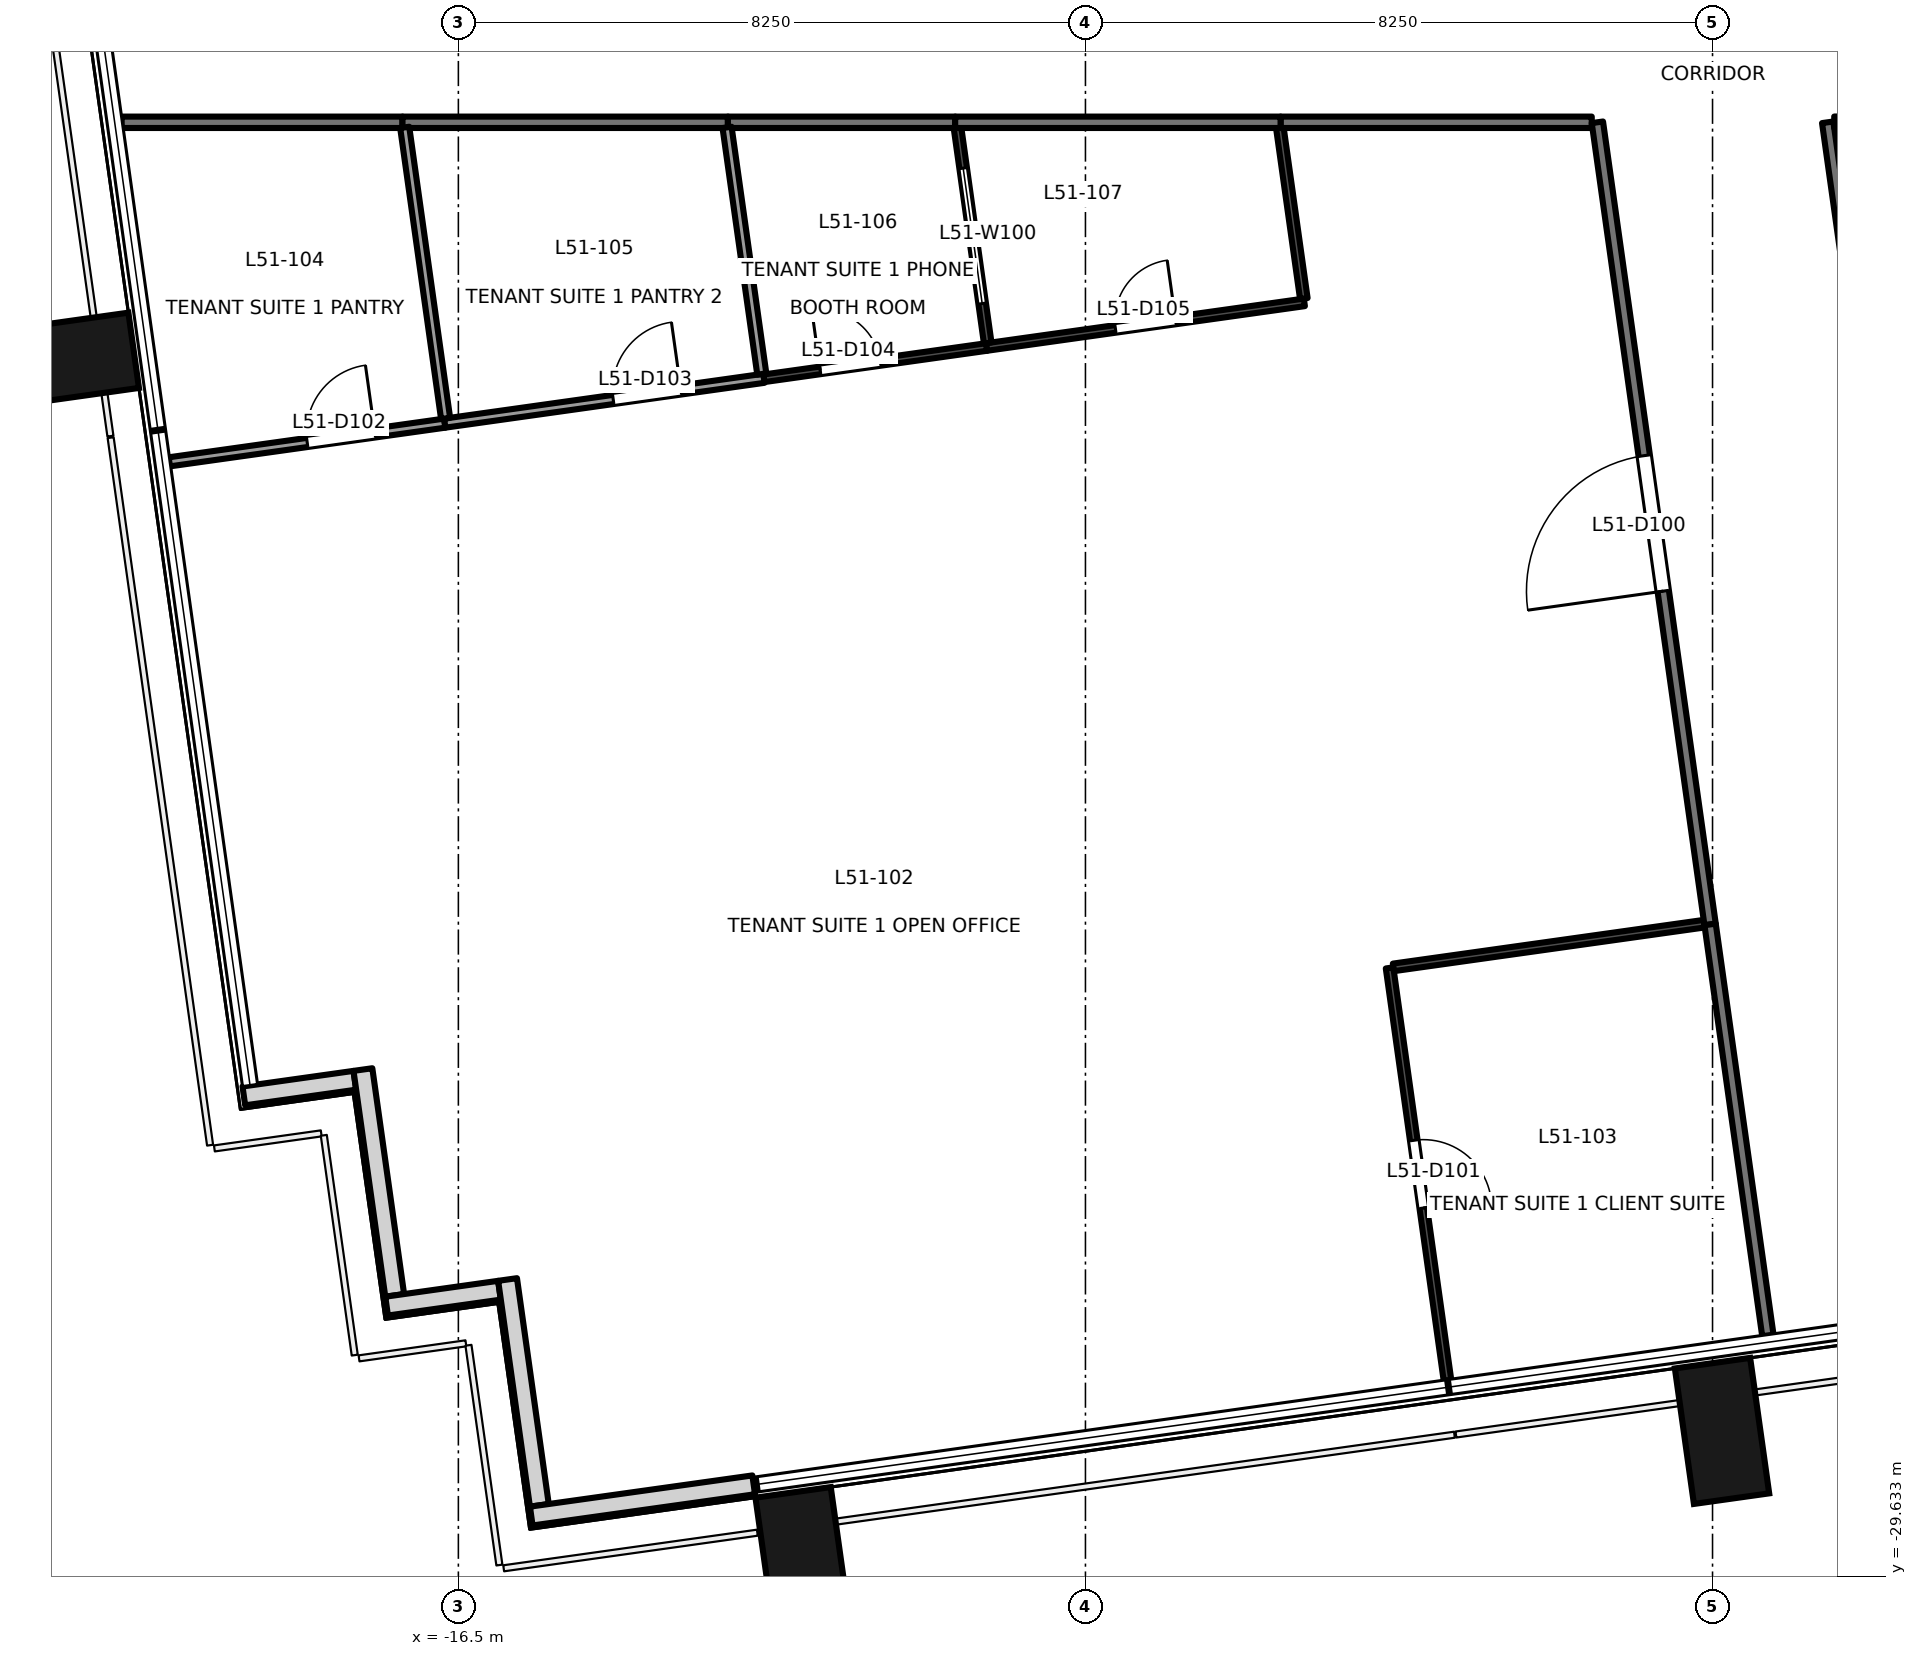
"""IFC4 building model, lengths in metres.
Left out: names, types, materials, properties, quantities, classifications, styles, units other than length and angle.
Written with IfcOpenShell. Run it as: python <this file> out.ifc"""

import sys

from ifc_helpers import new_model, si_unit, direction, frame, frame_2d, origin, origin_2d, place, context, subcontext, project, spatial, rectangle, extrude, element, fill, save


model = new_model("IFC4")
c1 = context("Model", 3, precision=1e-05, world=origin(), true_north=direction((0.0, 1.0)))
c2 = subcontext(c1, "Body", "Model", "MODEL_VIEW")
j1 = project(units=[si_unit("LENGTHUNIT", "METRE"), si_unit("PLANEANGLEUNIT", "RADIAN")], contexts=[c1])
p1 = place(None, origin())
s1 = spatial("IfcSite", under=j1, at=p1, CompositionType="ELEMENT")
p2 = place(p1, origin())
s2 = spatial("IfcBuilding", under=s1, at=p2, CompositionType="ELEMENT")
p3 = place(p2, frame((0.0, 0.0, 225.2)))
s3 = spatial("IfcBuildingStorey", under=s2, at=p3, CompositionType="ELEMENT", Elevation=225.2)
for number, where, z_axis, x_axis in (
    (1, (-11.971, -29.416, -0.2), (0.0, 0.0, 1.0), (0.99, 0.139, 0.0)),
    (2, (0.125, -27.716, -0.2), (0.0, 0.0, 1.0), (0.99, 0.139, 0.0)),
    (3, (-21.663, -13.625, -0.2), (0.0, 0.0, 1.0), (-0.139, 0.99, 0.0)),
):
    element("IfcColumn", number, at=place(p3, frame(where, z_axis=z_axis, x_axis=x_axis)), inside=s3, PredefinedType="COLUMN", context=c2, shape_type="SweptSolid", body=[
        extrude(rectangle(XDim=1.0, YDim=1.8, at=origin_2d()), origin(), (0.0, 0.0, 1.0), 3.9),
    ])
p4 = place(p3, frame((-19.322, -23.309, 0.0), z_axis=(0.0, 0.0, 1.0), x_axis=(0.990235520307, 0.13940449893, 0.0)))
e4 = element("IfcWall", 4, at=p4, inside=s3, PredefinedType="SOLIDWALL", context=c2, shape_type="SweptSolid", body=[
    extrude(rectangle(XDim=1.475, YDim=0.25, at=frame_2d((0.737, 0.0))), origin(), (0.0, 0.0, 1.0), 3.7),
])
p5 = place(p3, frame((-17.756, -22.962, 0.0), z_axis=(0.0, 0.0, 1.0), x_axis=(0.139393225799, -0.990237107263, 0.0)))
e5 = element("IfcWall", 5, at=p5, inside=s3, PredefinedType="SOLIDWALL", context=c2, shape_type="SweptSolid", body=[
    extrude(rectangle(XDim=3.0, YDim=0.25, at=frame_2d((1.5, 0.0))), origin(), (0.0, 0.0, 1.0), 3.7),
])
p6 = place(p3, frame((-17.444, -26.074, 0.0), z_axis=(0.0, 0.0, 1.0), x_axis=(0.990240434918, 0.139369584395, 0.0)))
e6 = element("IfcWall", 6, at=p6, inside=s3, PredefinedType="SOLIDWALL", context=c2, shape_type="SweptSolid", body=[
    extrude(rectangle(XDim=1.5, YDim=0.25, at=frame_2d((0.75, 0.0))), origin(), (0.0, 0.0, 1.0), 3.7),
])
p7 = place(p3, frame((-15.853, -25.724, 0.0), z_axis=(0.0, 0.0, 1.0), x_axis=(0.139302206688, -0.990249915532, 0.0)))
e7 = element("IfcWall", 7, at=p7, inside=s3, PredefinedType="SOLIDWALL", context=c2, shape_type="SweptSolid", body=[
    extrude(rectangle(XDim=3.0, YDim=0.25, at=frame_2d((1.5, 0.0))), origin(), (0.0, 0.0, 1.0), 3.7),
])
p8 = place(p3, frame((-15.541, -28.836, 0.0), z_axis=(0.0, 0.0, 1.0), x_axis=(0.990285396533, 0.139049751574, 0.0)))
e8 = element("IfcWall", 8, at=p8, inside=s3, PredefinedType="SOLIDWALL", context=c2, shape_type="SweptSolid", body=[
    extrude(rectangle(XDim=2.955, YDim=0.25, at=frame_2d((1.478, 0.0))), origin(), (0.0, 0.0, 1.0), 3.7),
])
p9 = place(p3, frame((-1.589, -10.5, 0.0), z_axis=(0.0, 0.0, 1.0), x_axis=(-1.0, 0.0, 0.0)))
e9 = element("IfcWall", 9, at=p9, inside=s3, PredefinedType="PARTITIONING", context=c2, shape_type="SweptSolid", body=[
    extrude(rectangle(XDim=4.094, YDim=0.15, at=frame_2d((2.047, 0.0))), origin(), (0.0, 0.0, 1.0), 2.8),
])
p10 = place(p3, frame((-0.032, -21.053, 0.0), z_axis=(0.0, 0.0, 1.0), x_axis=(-0.139153385275, 0.9902708394, 0.0)))
e10 = element("IfcWall", 10, at=p10, inside=s3, PredefinedType="PARTITIONING", context=c2, shape_type="SweptSolid", body=[
    extrude(rectangle(XDim=10.657, YDim=0.15, at=frame_2d((5.328, 0.0))), origin(), (0.0, 0.0, 1.0), 2.8),
])
p11 = place(p10, frame((4.428, 0.0, 0.0)))
e11 = element("IfcOpeningElement", 11, at=p11, cuts=e10, PredefinedType="OPENING", context=c2, shape_type="SweptSolid", body=[
    extrude(rectangle(XDim=1.8, YDim=2.1, at=frame_2d((0.9, 1.05))), frame((0.0, 0.085, 0.0), z_axis=(0.0, -1.0, 0.0), x_axis=(1.0, 0.0, 0.0)), (0.0, 0.0, 1.0), 0.171),
])
p12 = place(p3, frame((0.728, -26.46, 0.0), z_axis=(0.0, 0.0, 1.0), x_axis=(-0.139192487281, 0.990265343978, 0.0)))
e12 = element("IfcWall", 12, at=p12, inside=s3, PredefinedType="PARTITIONING", context=c2, shape_type="SweptSolid", body=[
    extrude(rectangle(XDim=5.46, YDim=0.15, at=frame_2d((2.73, 0.0))), origin(), (0.0, 0.0, 1.0), 2.8),
])
p13 = place(p3, frame((-17.235, -10.5, 0.0), z_axis=(0.0, 0.0, 1.0), x_axis=(-1.0, 0.0, 0.0)))
e13 = element("IfcWall", 13, at=p13, inside=s3, PredefinedType="PARTITIONING", context=c2, shape_type="SweptSolid", body=[
    extrude(rectangle(XDim=3.695, YDim=0.15, at=frame_2d((1.847, 0.0))), origin(), (0.0, 0.0, 1.0), 3.7),
])
p14 = place(p3, frame((-12.954, -10.5, 0.0), z_axis=(0.0, 0.0, 1.0), x_axis=(-1.0, 0.0, 0.0)))
e14 = element("IfcWall", 14, at=p14, inside=s3, PredefinedType="PARTITIONING", context=c2, shape_type="SweptSolid", body=[
    extrude(rectangle(XDim=4.281, YDim=0.15, at=frame_2d((2.141, 0.0))), origin(), (0.0, 0.0, 1.0), 3.7),
])
p15 = place(p3, frame((-9.964, -10.5, 0.0), z_axis=(0.0, 0.0, 1.0), x_axis=(-1.0, 0.0, 0.0)))
e15 = element("IfcWall", 15, at=p15, inside=s3, PredefinedType="PARTITIONING", context=c2, shape_type="SweptSolid", body=[
    extrude(rectangle(XDim=2.99, YDim=0.15, at=frame_2d((1.495, 0.0))), origin(), (0.0, 0.0, 1.0), 3.7),
])
p16 = place(p3, frame((-5.683, -10.5, 0.0), z_axis=(0.0, 0.0, 1.0), x_axis=(-1.0, 0.0, 0.0)))
e16 = element("IfcWall", 16, at=p16, inside=s3, PredefinedType="PARTITIONING", context=c2, shape_type="SweptSolid", body=[
    extrude(rectangle(XDim=4.281, YDim=0.15, at=frame_2d((2.141, 0.0))), origin(), (0.0, 0.0, 1.0), 2.8),
])
p17 = place(p3, frame((1.515, -10.5, 0.0), z_axis=(0.0, 0.0, 1.0), x_axis=(0.139146821365, -0.990271761742, 0.0)))
e17 = element("IfcWall", 17, at=p17, inside=s3, PredefinedType="PARTITIONING", context=c2, shape_type="SweptSolid", body=[
    extrude(rectangle(XDim=4.779, YDim=0.15, at=frame_2d((2.39, 0.0))), origin(), (0.0, 0.0, 1.0), 3.7),
])
p18 = place(p3, frame((4.524, -10.499, 0.0), z_axis=(0.0, 0.0, 1.0), x_axis=(-1.0, 0.0, 0.0)))
e18 = element("IfcWall", 18, at=p18, inside=s3, PredefinedType="PARTITIONING", context=c2, shape_type="SweptSolid", body=[
    extrude(rectangle(XDim=2.923, YDim=0.15, at=frame_2d((1.461, 0.0))), origin(), (0.0, 0.0, 1.0), 2.8),
])
p19 = place(p3, frame((-4.249, -21.625, 0.0), z_axis=(0.0, 0.0, 1.0), x_axis=(0.13906298859, -0.990283537783, 0.0)))
e19 = element("IfcWall", 19, at=p19, inside=s3, PredefinedType="PARTITIONING", context=c2, shape_type="SweptSolid", body=[
    extrude(rectangle(XDim=5.479, YDim=0.1, at=frame_2d((2.74, 0.0))), origin(), (0.0, 0.0, 1.0), 3.7),
])
p20 = place(p19, frame((2.29, 0.0, 0.0)))
e20 = element("IfcOpeningElement", 20, at=p20, cuts=e19, PredefinedType="OPENING", context=c2, shape_type="SweptSolid", body=[
    extrude(rectangle(XDim=0.9, YDim=2.1, at=frame_2d((0.45, 1.05))), frame((0.0, 0.061, 0.0), z_axis=(0.0, -1.0, 0.0), x_axis=(1.0, 0.0, 0.0)), (0.0, 0.0, 1.0), 0.121),
])
p21 = place(p3, frame((-0.109, -21.043, 0.0), z_axis=(0.0, 0.0, 1.0), x_axis=(-0.990263837068, -0.139203207563, 0.0)))
e21 = element("IfcWall", 21, at=p21, inside=s3, PredefinedType="PARTITIONING", context=c2, shape_type="SweptSolid", body=[
    extrude(rectangle(XDim=4.13, YDim=0.1, at=frame_2d((2.065, 0.0))), origin(), (0.0, 0.0, 1.0), 2.8),
])
p22 = place(p3, frame((-20.303, -14.967, 0.0), z_axis=(0.0, 0.0, 1.0), x_axis=(0.990278989802, 0.139095371445, 0.0)))
e22 = element("IfcWall", 22, at=p22, inside=s3, PredefinedType="PARTITIONING", context=c2, shape_type="SweptSolid", body=[
    extrude(rectangle(XDim=3.66, YDim=0.12, at=frame_2d((1.83, 0.0))), origin(), (0.0, 0.0, 1.0), 3.7),
])
p23 = place(p22, frame((1.832, 0.0, 0.0)))
e23 = element("IfcOpeningElement", 23, at=p23, cuts=e22, PredefinedType="OPENING", context=c2, shape_type="SweptSolid", body=[
    extrude(rectangle(XDim=0.9, YDim=2.1, at=frame_2d((0.45, 1.05))), frame((0.0, 0.071, 0.0), z_axis=(0.0, -1.0, 0.0), x_axis=(1.0, 0.0, 0.0)), (0.0, 0.0, 1.0), 0.141),
])
p24 = place(p3, frame((-16.679, -14.458, 0.0), z_axis=(0.0, 0.0, 1.0), x_axis=(0.990269352743, 0.139163964508, 0.0)))
e24 = element("IfcWall", 24, at=p24, inside=s3, PredefinedType="PARTITIONING", context=c2, shape_type="SweptSolid", body=[
    extrude(rectangle(XDim=4.24, YDim=0.12, at=frame_2d((2.12, 0.0))), origin(), (0.0, 0.0, 1.0), 3.7),
])
p25 = place(p24, frame((2.238, 0.0, 0.0)))
e25 = element("IfcOpeningElement", 25, at=p25, cuts=e24, PredefinedType="OPENING", context=c2, shape_type="SweptSolid", body=[
    extrude(rectangle(XDim=0.9, YDim=2.1, at=frame_2d((0.45, 1.05))), frame((0.0, 0.071, 0.0), z_axis=(0.0, -1.0, 0.0), x_axis=(1.0, 0.0, 0.0)), (0.0, 0.0, 1.0), 0.141),
])
p26 = place(p3, frame((-12.48, -13.868, 0.0), z_axis=(0.0, 0.0, 1.0), x_axis=(0.990270259545, 0.139157511691, 0.0)))
e26 = element("IfcWall", 26, at=p26, inside=s3, PredefinedType="PARTITIONING", context=c2, shape_type="SweptSolid", body=[
    extrude(rectangle(XDim=2.96, YDim=0.1, at=frame_2d((1.48, 0.0))), origin(), (0.0, 0.0, 1.0), 3.7),
])
p27 = place(p26, frame((0.748, 0.0, 0.0)))
e27 = element("IfcOpeningElement", 27, at=p27, cuts=e26, PredefinedType="OPENING", context=c2, shape_type="SweptSolid", body=[
    extrude(rectangle(XDim=0.8, YDim=2.1, at=frame_2d((0.4, 1.05))), frame((0.0, 0.061, 0.0), z_axis=(0.0, -1.0, 0.0), x_axis=(1.0, 0.0, 0.0)), (0.0, 0.0, 1.0), 0.121),
])
p28 = place(p3, frame((-9.549, -13.456, 0.0), z_axis=(0.0, 0.0, 1.0), x_axis=(0.99027315077, 0.139136935655, 0.0)))
e28 = element("IfcWall", 28, at=p28, inside=s3, PredefinedType="PARTITIONING", context=c2, shape_type="SweptSolid", body=[
    extrude(rectangle(XDim=4.22, YDim=0.1, at=frame_2d((2.11, 0.0))), origin(), (0.0, 0.0, 1.0), 2.8),
])
p29 = place(p28, frame((1.71, 0.0, 0.0)))
e29 = element("IfcOpeningElement", 29, at=p29, cuts=e28, PredefinedType="OPENING", context=c2, shape_type="SweptSolid", body=[
    extrude(rectangle(XDim=0.8, YDim=2.1, at=frame_2d((0.4, 1.05))), frame((0.0, 0.061, 0.0), z_axis=(0.0, -1.0, 0.0), x_axis=(1.0, 0.0, 0.0)), (0.0, 0.0, 1.0), 0.121),
])
p30 = place(p3, frame((-5.377, -12.819, 0.0), z_axis=(0.0, 0.0, 1.0), x_axis=(-0.139090262588, 0.990279707382, 0.0)))
e30 = element("IfcWall", 30, at=p30, inside=s3, PredefinedType="PARTITIONING", context=c2, shape_type="SweptSolid", body=[
    extrude(rectangle(XDim=2.273, YDim=0.1, at=frame_2d((1.137, 0.0))), origin(), (0.0, 0.0, 1.0), 3.7),
])
p31 = place(p3, frame((-17.206, -10.567, 0.0), z_axis=(0.0, 0.0, 1.0), x_axis=(0.139158089335, -0.990270178372, 0.0)))
e31 = element("IfcWall", 31, at=p31, inside=s3, PredefinedType="PARTITIONING", context=c2, shape_type="SweptSolid", body=[
    extrude(rectangle(XDim=3.867, YDim=0.12, at=frame_2d((1.933, 0.0))), origin(), (0.0, 0.0, 1.0), 3.7),
])
p32 = place(p3, frame((-12.965, -10.567, 0.0), z_axis=(0.0, 0.0, 1.0), x_axis=(0.139460290977, -0.990227664348, 0.0)))
e32 = element("IfcWall", 32, at=p32, inside=s3, PredefinedType="PARTITIONING", context=c2, shape_type="SweptSolid", body=[
    extrude(rectangle(XDim=3.277, YDim=0.12, at=frame_2d((1.639, 0.0))), origin(), (0.0, 0.0, 1.0), 3.7),
])
p33 = place(p3, frame((-9.934, -10.568, 0.0), z_axis=(0.0, 0.0, 1.0), x_axis=(0.139092802353, -0.990279350655, 0.0)))
e33 = element("IfcWall", 33, at=p33, inside=s3, PredefinedType="PARTITIONING", context=c2, shape_type="SweptSolid", body=[
    extrude(rectangle(XDim=2.863, YDim=0.1, at=frame_2d((1.431, 0.0))), origin(), (0.0, 0.0, 1.0), 3.7),
])
p34 = place(p33, frame((0.54, 0.0, 0.9)))
e34 = element("IfcOpeningElement", 34, at=p34, cuts=e33, PredefinedType="OPENING", context=c2, shape_type="SweptSolid", body=[
    extrude(rectangle(XDim=1.8, YDim=1.2, at=frame_2d((0.9, 0.6))), frame((0.0, 0.061, 0.0), z_axis=(0.0, -1.0, 0.0), x_axis=(1.0, 0.0, 0.0)), (0.0, 0.0, 1.0), 0.121),
])
p35 = place(p11, origin())
e35 = element("IfcDoor", 35, at=p35, inside=s3, OperationType="DOUBLE_DOOR_SINGLE_SWING", PredefinedType="DOOR", context=c2, shape_type="SweptSolid", body=[
    extrude(rectangle(XDim=1.8, YDim=2.1, at=frame_2d((0.9, 1.05))), frame((0.0, 0.025, 0.0), z_axis=(0.0, -1.0, 0.0), x_axis=(1.0, 0.0, 0.0)), (0.0, 0.0, 1.0), 0.05),
])
fill(e11, e35)
p36 = place(p20, origin())
e36 = element("IfcDoor", 36, at=p36, inside=s3, OperationType="SINGLE_SWING_RIGHT", PredefinedType="DOOR", context=c2, shape_type="SweptSolid", body=[
    extrude(rectangle(XDim=0.9, YDim=2.1, at=frame_2d((0.45, 1.05))), frame((0.0, 0.025, 0.0), z_axis=(0.0, -1.0, 0.0), x_axis=(1.0, 0.0, 0.0)), (0.0, 0.0, 1.0), 0.05),
])
fill(e20, e36)
p37 = place(p23, origin())
e37 = element("IfcDoor", 37, at=p37, inside=s3, OperationType="SINGLE_SWING_RIGHT", PredefinedType="DOOR", context=c2, shape_type="SweptSolid", body=[
    extrude(rectangle(XDim=0.9, YDim=2.1, at=frame_2d((0.45, 1.05))), frame((0.0, 0.025, 0.0), z_axis=(0.0, -1.0, 0.0), x_axis=(1.0, 0.0, 0.0)), (0.0, 0.0, 1.0), 0.05),
])
fill(e23, e37)
p38 = place(p25, origin())
e38 = element("IfcDoor", 38, at=p38, inside=s3, OperationType="SINGLE_SWING_RIGHT", PredefinedType="DOOR", context=c2, shape_type="SweptSolid", body=[
    extrude(rectangle(XDim=0.9, YDim=2.1, at=frame_2d((0.45, 1.05))), frame((0.0, 0.025, 0.0), z_axis=(0.0, -1.0, 0.0), x_axis=(1.0, 0.0, 0.0)), (0.0, 0.0, 1.0), 0.05),
])
fill(e25, e38)
p39 = place(p27, origin())
e39 = element("IfcDoor", 39, at=p39, inside=s3, OperationType="SINGLE_SWING_LEFT", PredefinedType="DOOR", context=c2, shape_type="SweptSolid", body=[
    extrude(rectangle(XDim=0.8, YDim=2.1, at=frame_2d((0.4, 1.05))), frame((0.0, 0.025, 0.0), z_axis=(0.0, -1.0, 0.0), x_axis=(1.0, 0.0, 0.0)), (0.0, 0.0, 1.0), 0.05),
])
fill(e27, e39)
p40 = place(p29, origin())
e40 = element("IfcDoor", 40, at=p40, inside=s3, OperationType="SINGLE_SWING_RIGHT", PredefinedType="DOOR", context=c2, shape_type="SweptSolid", body=[
    extrude(rectangle(XDim=0.8, YDim=2.1, at=frame_2d((0.4, 1.05))), frame((0.0, 0.025, 0.0), z_axis=(0.0, -1.0, 0.0), x_axis=(1.0, 0.0, 0.0)), (0.0, 0.0, 1.0), 0.05),
])
fill(e29, e40)
p41 = place(p34, origin())
e41 = element("IfcWindow", 41, at=p41, inside=s3, PartitioningType="SINGLE_PANEL", PredefinedType="WINDOW", context=c2, shape_type="SweptSolid", body=[
    extrude(rectangle(XDim=1.8, YDim=1.2, at=frame_2d((0.9, 0.6))), frame((0.0, 0.03, 0.0), z_axis=(0.0, -1.0, 0.0), x_axis=(1.0, 0.0, 0.0)), (0.0, 0.0, 1.0), 0.06),
])
fill(e34, e41)
save(model, sys.argv[1])
